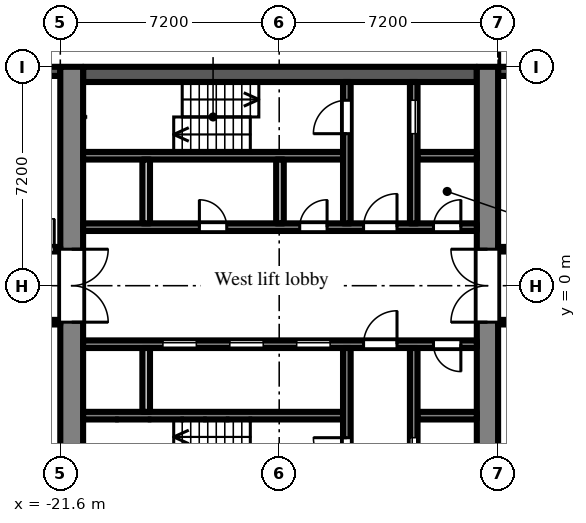
"""IFC4 building model, lengths in metres.
Left out: names, types, materials, properties, quantities, classifications, styles, units other than length and angle.
Written with IfcOpenShell. Run it as: python <this file> out.ifc"""

import sys

from ifc_helpers import new_model, si_unit, direction, frame, frame_2d, origin, place, context, subcontext, project, spatial, rectangle, extrude, element, fill, save


model = new_model("IFC4")
c1 = context("Model", 3, precision=1e-05, world=origin(), true_north=direction((0.0, 1.0)))
c2 = subcontext(c1, "Body", "Model", "MODEL_VIEW")
j1 = project(units=[si_unit("LENGTHUNIT", "METRE"), si_unit("PLANEANGLEUNIT", "RADIAN")], contexts=[c1])
p1 = place(None, origin())
s1 = spatial("IfcSite", under=j1, at=p1, CompositionType="ELEMENT")
p2 = place(p1, origin())
s2 = spatial("IfcBuilding", under=s1, at=p2, CompositionType="ELEMENT")
p3 = place(p2, frame((0.0, 0.0, 44.7)))
s3 = spatial("IfcBuildingStorey", under=s2, at=p3, CompositionType="ELEMENT", Elevation=44.7)
p4 = place(p3, frame((-4.2, 7.05, 0.0), z_axis=(0.0, 0.0, 1.0), x_axis=(-1.0, 0.0, 0.0)))
e1 = element("IfcWall", 1, at=p4, inside=s3, PredefinedType="SOLIDWALL", context=c2, shape_type="SweptSolid", body=[
    extrude(rectangle(XDim=3.0, YDim=0.3, at=frame_2d((1.5, 0.0))), origin(), (0.0, 0.0, 1.0), 2.1),
])
p5 = place(p3, frame((-21.6, 7.05, 0.0), z_axis=(0.0, 0.0, 1.0), x_axis=(-1.0, 0.0, 0.0)))
e2 = element("IfcWall", 2, at=p5, inside=s3, PredefinedType="SOLIDWALL", context=c2, shape_type="SweptSolid", body=[
    extrude(rectangle(XDim=2.7, YDim=0.3, at=frame_2d((1.35, 0.0))), origin(), (0.0, 0.0, 1.0), 2.1),
])
p6 = place(p5, frame((0.75, 0.0, 0.2)))
e3 = element("IfcOpeningElement", 3, at=p6, cuts=e2, PredefinedType="OPENING", context=c2, shape_type="SweptSolid", body=[
    extrude(rectangle(XDim=1.2, YDim=1.85, at=frame_2d((0.6, 0.925))), frame((0.0, 0.16, 0.0), z_axis=(0.0, -1.0, 0.0), x_axis=(1.0, 0.0, 0.0)), (0.0, 0.0, 1.0), 0.32),
])
p7 = place(p3, frame((-7.55, -7.2, 0.0), z_axis=(0.0, 0.0, 1.0), x_axis=(0.0, 1.0, 0.0)))
e4 = element("IfcWall", 4, at=p7, inside=s3, PredefinedType="SHEAR", context=c2, shape_type="SweptSolid", body=[
    extrude(rectangle(XDim=14.4, YDim=0.7, at=frame_2d((7.2, 0.0))), origin(), (0.0, 0.0, 1.0), 2.575),
])
p8 = place(p7, frame((6.0, 0.0, 0.0)))
e5 = element("IfcOpeningElement", 5, at=p8, cuts=e4, PredefinedType="OPENING", context=c2, shape_type="SweptSolid", body=[
    extrude(rectangle(XDim=2.4, YDim=2.2, at=frame_2d((1.2, 1.1))), frame((0.0, 0.36, 0.0), z_axis=(0.0, -1.0, 0.0), x_axis=(1.0, 0.0, 0.0)), (0.0, 0.0, 1.0), 0.72),
])
p9 = place(p3, frame((-21.225, -7.2, 0.0), z_axis=(0.0, 0.0, 1.0), x_axis=(0.0, 1.0, 0.0)))
e6 = element("IfcWall", 6, at=p9, inside=s3, PredefinedType="SHEAR", context=c2, shape_type="SweptSolid", body=[
    extrude(rectangle(XDim=14.4, YDim=0.75, at=frame_2d((7.2, 0.0))), origin(), (0.0, 0.0, 1.0), 2.575),
])
p10 = place(p9, frame((6.0, 0.0, 0.0)))
e7 = element("IfcOpeningElement", 7, at=p10, cuts=e6, PredefinedType="OPENING", context=c2, shape_type="SweptSolid", body=[
    extrude(rectangle(XDim=2.4, YDim=2.2, at=frame_2d((1.2, 1.1))), frame((0.0, 0.385, 0.0), z_axis=(0.0, -1.0, 0.0), x_axis=(1.0, 0.0, 0.0)), (0.0, 0.0, 1.0), 0.77),
])
p11 = place(p3, frame((-7.9, 6.95, 0.0), z_axis=(0.0, 0.0, 1.0), x_axis=(-1.0, 0.0, 0.0)))
e8 = element("IfcWall", 8, at=p11, inside=s3, PredefinedType="SHEAR", context=c2, shape_type="SweptSolid", body=[
    extrude(rectangle(XDim=12.95, YDim=0.5, at=frame_2d((6.475, 0.0))), origin(), (0.0, 0.0, 1.0), 2.575),
])
p12 = place(p3, frame((-7.9, 1.925, 0.0), z_axis=(0.0, 0.0, 1.0), x_axis=(-1.0, 0.0, 0.0)))
e9 = element("IfcWall", 9, at=p12, inside=s3, PredefinedType="SHEAR", context=c2, shape_type="SweptSolid", body=[
    extrude(rectangle(XDim=12.95, YDim=0.25, at=frame_2d((6.475, 0.0))), origin(), (0.0, 0.0, 1.0), 2.575),
])
p13 = place(p12, frame((0.525, 0.0, 0.0)))
e10 = element("IfcOpeningElement", 10, at=p13, cuts=e9, PredefinedType="OPENING", context=c2, shape_type="SweptSolid", body=[
    extrude(rectangle(XDim=0.9, YDim=2.1, at=frame_2d((0.45, 1.05))), frame((0.0, 0.135, 0.0), z_axis=(0.0, -1.0, 0.0), x_axis=(1.0, 0.0, 0.0)), (0.0, 0.0, 1.0), 0.27),
])
p14 = place(p12, frame((2.625, 0.0, 0.0)))
e11 = element("IfcOpeningElement", 11, at=p14, cuts=e9, PredefinedType="OPENING", context=c2, shape_type="SweptSolid", body=[
    extrude(rectangle(XDim=1.1, YDim=2.1, at=frame_2d((0.55, 1.05))), frame((0.0, 0.135, 0.0), z_axis=(0.0, -1.0, 0.0), x_axis=(1.0, 0.0, 0.0)), (0.0, 0.0, 1.0), 0.27),
])
p15 = place(p12, frame((4.925, 0.0, 0.0)))
e12 = element("IfcOpeningElement", 12, at=p15, cuts=e9, PredefinedType="OPENING", context=c2, shape_type="SweptSolid", body=[
    extrude(rectangle(XDim=0.9, YDim=2.1, at=frame_2d((0.45, 1.05))), frame((0.0, 0.135, 0.0), z_axis=(0.0, -1.0, 0.0), x_axis=(1.0, 0.0, 0.0)), (0.0, 0.0, 1.0), 0.27),
])
p16 = place(p12, frame((8.225, 0.0, 0.0)))
e13 = element("IfcOpeningElement", 13, at=p16, cuts=e9, PredefinedType="OPENING", context=c2, shape_type="SweptSolid", body=[
    extrude(rectangle(XDim=0.9, YDim=2.1, at=frame_2d((0.45, 1.05))), frame((0.0, 0.135, 0.0), z_axis=(0.0, -1.0, 0.0), x_axis=(1.0, 0.0, 0.0)), (0.0, 0.0, 1.0), 0.27),
])
p17 = place(p3, frame((-7.9, 4.275, 0.0), z_axis=(0.0, 0.0, 1.0), x_axis=(-1.0, 0.0, 0.0)))
e14 = element("IfcWall", 14, at=p17, inside=s3, PredefinedType="SHEAR", context=c2, shape_type="SweptSolid", body=[
    extrude(rectangle(XDim=1.95, YDim=0.25, at=frame_2d((0.975, 0.0))), origin(), (0.0, 0.0, 1.0), 2.575),
])
p18 = place(p3, frame((-12.3, 4.275, 0.0), z_axis=(0.0, 0.0, 1.0), x_axis=(-1.0, 0.0, 0.0)))
e15 = element("IfcWall", 15, at=p18, inside=s3, PredefinedType="SHEAR", context=c2, shape_type="SweptSolid", body=[
    extrude(rectangle(XDim=8.55, YDim=0.25, at=frame_2d((4.275, 0.0))), origin(), (0.0, 0.0, 1.0), 2.575),
])
p19 = place(p3, frame((-9.975, 2.05, 0.0), z_axis=(0.0, 0.0, 1.0), x_axis=(0.0, 1.0, 0.0)))
e16 = element("IfcWall", 16, at=p19, inside=s3, PredefinedType="SHEAR", context=c2, shape_type="SweptSolid", body=[
    extrude(rectangle(XDim=4.65, YDim=0.25, at=frame_2d((2.325, 0.0))), origin(), (0.0, 0.0, 1.0), 2.575),
])
p20 = place(p19, frame((2.95, 0.0, 0.0)))
e17 = element("IfcOpeningElement", 17, at=p20, cuts=e16, PredefinedType="OPENING", context=c2, shape_type="SweptSolid", body=[
    extrude(rectangle(XDim=1.1, YDim=2.1, at=frame_2d((0.55, 1.05))), frame((0.0, 0.135, 0.0), z_axis=(0.0, -1.0, 0.0), x_axis=(1.0, 0.0, 0.0)), (0.0, 0.0, 1.0), 0.27),
])
p21 = place(p3, frame((-12.175, 2.05, 0.0), z_axis=(0.0, 0.0, 1.0), x_axis=(0.0, 1.0, 0.0)))
e18 = element("IfcWall", 18, at=p21, inside=s3, PredefinedType="SHEAR", context=c2, shape_type="SweptSolid", body=[
    extrude(rectangle(XDim=4.65, YDim=0.25, at=frame_2d((2.325, 0.0))), origin(), (0.0, 0.0, 1.0), 2.575),
])
p22 = place(p21, frame((2.95, 0.0, 0.0)))
e19 = element("IfcOpeningElement", 19, at=p22, cuts=e18, PredefinedType="OPENING", context=c2, shape_type="SweptSolid", body=[
    extrude(rectangle(XDim=1.1, YDim=2.1, at=frame_2d((0.55, 1.05))), frame((0.0, 0.135, 0.0), z_axis=(0.0, -1.0, 0.0), x_axis=(1.0, 0.0, 0.0)), (0.0, 0.0, 1.0), 0.27),
])
for number, where, z_axis, x_axis in (
    (20, (-14.375, 2.05, 0.0), (0.0, 0.0, 1.0), (0.0, 1.0, 0.0)),
    (21, (-18.775, 2.05, 0.0), (0.0, 0.0, 1.0), (0.0, 1.0, 0.0)),
):
    element("IfcWall", number, at=place(p3, frame(where, z_axis=z_axis, x_axis=x_axis)), inside=s3, PredefinedType="PARTITIONING", context=c2, shape_type="SweptSolid", body=[
        extrude(rectangle(XDim=2.1, YDim=0.25, at=frame_2d((1.05, 0.0))), origin(), (0.0, 0.0, 1.0), 2.575),
    ])
p23 = place(p3, frame((-7.9, -1.925, 0.0), z_axis=(0.0, 0.0, 1.0), x_axis=(-1.0, 0.0, 0.0)))
e22 = element("IfcWall", 22, at=p23, inside=s3, PredefinedType="SHEAR", context=c2, shape_type="SweptSolid", body=[
    extrude(rectangle(XDim=12.95, YDim=0.25, at=frame_2d((6.475, 0.0))), origin(), (0.0, 0.0, 1.0), 2.575),
])
p24 = place(p23, frame((4.825, 0.0, 0.0)))
e23 = element("IfcOpeningElement", 23, at=p24, cuts=e22, PredefinedType="OPENING", context=c2, shape_type="SweptSolid", body=[
    extrude(rectangle(XDim=1.1, YDim=2.1, at=frame_2d((0.55, 1.05))), frame((0.0, 0.135, 0.0), z_axis=(0.0, -1.0, 0.0), x_axis=(1.0, 0.0, 0.0)), (0.0, 0.0, 1.0), 0.27),
])
p25 = place(p23, frame((7.025, 0.0, 0.0)))
e24 = element("IfcOpeningElement", 24, at=p25, cuts=e22, PredefinedType="OPENING", context=c2, shape_type="SweptSolid", body=[
    extrude(rectangle(XDim=1.1, YDim=2.1, at=frame_2d((0.55, 1.05))), frame((0.0, 0.135, 0.0), z_axis=(0.0, -1.0, 0.0), x_axis=(1.0, 0.0, 0.0)), (0.0, 0.0, 1.0), 0.27),
])
p26 = place(p23, frame((9.225, 0.0, 0.0)))
e25 = element("IfcOpeningElement", 25, at=p26, cuts=e22, PredefinedType="OPENING", context=c2, shape_type="SweptSolid", body=[
    extrude(rectangle(XDim=1.1, YDim=2.1, at=frame_2d((0.55, 1.05))), frame((0.0, 0.135, 0.0), z_axis=(0.0, -1.0, 0.0), x_axis=(1.0, 0.0, 0.0)), (0.0, 0.0, 1.0), 0.27),
])
p27 = place(p23, frame((0.525, 0.0, 0.0)))
e26 = element("IfcOpeningElement", 26, at=p27, cuts=e22, PredefinedType="OPENING", context=c2, shape_type="SweptSolid", body=[
    extrude(rectangle(XDim=0.9, YDim=2.1, at=frame_2d((0.45, 1.05))), frame((0.0, 0.135, 0.0), z_axis=(0.0, -1.0, 0.0), x_axis=(1.0, 0.0, 0.0)), (0.0, 0.0, 1.0), 0.27),
])
p28 = place(p23, frame((2.625, 0.0, 0.0)))
e27 = element("IfcOpeningElement", 27, at=p28, cuts=e22, PredefinedType="OPENING", context=c2, shape_type="SweptSolid", body=[
    extrude(rectangle(XDim=1.1, YDim=2.1, at=frame_2d((0.55, 1.05))), frame((0.0, 0.135, 0.0), z_axis=(0.0, -1.0, 0.0), x_axis=(1.0, 0.0, 0.0)), (0.0, 0.0, 1.0), 0.27),
])
p29 = place(p3, frame((-7.9, -4.275, 0.0), z_axis=(0.0, 0.0, 1.0), x_axis=(-1.0, 0.0, 0.0)))
e28 = element("IfcWall", 28, at=p29, inside=s3, PredefinedType="SHEAR", context=c2, shape_type="SweptSolid", body=[
    extrude(rectangle(XDim=1.95, YDim=0.25, at=frame_2d((0.975, 0.0))), origin(), (0.0, 0.0, 1.0), 2.575),
])
p30 = place(p3, frame((-12.3, -4.275, 0.0), z_axis=(0.0, 0.0, 1.0), x_axis=(-1.0, 0.0, 0.0)))
e29 = element("IfcWall", 29, at=p30, inside=s3, PredefinedType="SHEAR", context=c2, shape_type="SweptSolid", body=[
    extrude(rectangle(XDim=8.55, YDim=0.25, at=frame_2d((4.275, 0.0))), origin(), (0.0, 0.0, 1.0), 2.575),
])
p31 = place(p3, frame((-9.975, -2.05, 0.0), z_axis=(0.0, 0.0, 1.0), x_axis=(0.0, -1.0, 0.0)))
e30 = element("IfcWall", 30, at=p31, inside=s3, PredefinedType="SHEAR", context=c2, shape_type="SweptSolid", body=[
    extrude(rectangle(XDim=4.65, YDim=0.25, at=frame_2d((2.325, 0.0))), origin(), (0.0, 0.0, 1.0), 2.575),
])
p32 = place(p31, frame((2.95, 0.0, 0.0)))
e31 = element("IfcOpeningElement", 31, at=p32, cuts=e30, PredefinedType="OPENING", context=c2, shape_type="SweptSolid", body=[
    extrude(rectangle(XDim=1.1, YDim=2.1, at=frame_2d((0.55, 1.05))), frame((0.0, 0.135, 0.0), z_axis=(0.0, -1.0, 0.0), x_axis=(1.0, 0.0, 0.0)), (0.0, 0.0, 1.0), 0.27),
])
p33 = place(p3, frame((-12.175, -2.05, 0.0), z_axis=(0.0, 0.0, 1.0), x_axis=(0.0, -1.0, 0.0)))
e32 = element("IfcWall", 32, at=p33, inside=s3, PredefinedType="SHEAR", context=c2, shape_type="SweptSolid", body=[
    extrude(rectangle(XDim=4.65, YDim=0.25, at=frame_2d((2.325, 0.0))), origin(), (0.0, 0.0, 1.0), 2.575),
])
p34 = place(p33, frame((2.95, 0.0, 0.0)))
e33 = element("IfcOpeningElement", 33, at=p34, cuts=e32, PredefinedType="OPENING", context=c2, shape_type="SweptSolid", body=[
    extrude(rectangle(XDim=1.1, YDim=2.1, at=frame_2d((0.55, 1.05))), frame((0.0, 0.135, 0.0), z_axis=(0.0, -1.0, 0.0), x_axis=(1.0, 0.0, 0.0)), (0.0, 0.0, 1.0), 0.27),
])
p35 = place(p3, frame((-18.775, -2.05, 0.0), z_axis=(0.0, 0.0, 1.0), x_axis=(0.0, -1.0, 0.0)))
e34 = element("IfcWall", 34, at=p35, inside=s3, PredefinedType="PARTITIONING", context=c2, shape_type="SweptSolid", body=[
    extrude(rectangle(XDim=2.1, YDim=0.25, at=frame_2d((1.05, 0.0))), origin(), (0.0, 0.0, 1.0), 2.575),
])
p36 = place(p3, frame((-36.5, -1.2, 0.0), z_axis=(0.0, 0.0, 1.0), x_axis=(1.0, 0.0, 0.0)))
e35 = element("IfcWall", 35, at=p36, inside=s3, PredefinedType="PARTITIONING", context=c2, shape_type="SweptSolid", body=[
    extrude(rectangle(XDim=14.9, YDim=0.15, at=frame_2d((7.45, 0.0))), origin(), (0.0, 0.0, 1.0), 2.575),
])
p37 = place(p36, frame((13.3, 0.0, 0.0)))
e36 = element("IfcOpeningElement", 36, at=p37, cuts=e35, PredefinedType="OPENING", context=c2, shape_type="SweptSolid", body=[
    extrude(rectangle(XDim=1.0, YDim=2.1, at=frame_2d((0.5, 1.05))), frame((0.0, 0.085, 0.0), z_axis=(0.0, -1.0, 0.0), x_axis=(1.0, 0.0, 0.0)), (0.0, 0.0, 1.0), 0.17),
])
p38 = place(p36, frame((4.41, 0.0, 0.0)))
e37 = element("IfcOpeningElement", 37, at=p38, cuts=e35, PredefinedType="OPENING", context=c2, shape_type="SweptSolid", body=[
    extrude(rectangle(XDim=1.0, YDim=2.1, at=frame_2d((0.5, 1.05))), frame((0.0, 0.085, 0.0), z_axis=(0.0, -1.0, 0.0), x_axis=(1.0, 0.0, 0.0)), (0.0, 0.0, 1.0), 0.17),
])
p39 = place(p36, frame((1.15, 0.0, 0.0)))
e38 = element("IfcOpeningElement", 38, at=p39, cuts=e35, PredefinedType="OPENING", context=c2, shape_type="SweptSolid", body=[
    extrude(rectangle(XDim=1.8, YDim=2.1, at=frame_2d((0.9, 1.05))), frame((0.0, 0.085, 0.0), z_axis=(0.0, -1.0, 0.0), x_axis=(1.0, 0.0, 0.0)), (0.0, 0.0, 1.0), 0.17),
])
p40 = place(p3, frame((-36.5, 1.2, 0.0), z_axis=(0.0, 0.0, 1.0), x_axis=(1.0, 0.0, 0.0)))
e39 = element("IfcWall", 39, at=p40, inside=s3, PredefinedType="PARTITIONING", context=c2, shape_type="SweptSolid", body=[
    extrude(rectangle(XDim=14.9, YDim=0.15, at=frame_2d((7.45, 0.0))), origin(), (0.0, 0.0, 1.0), 2.575),
])
p41 = place(p40, frame((13.7, 0.0, 0.0)))
e40 = element("IfcOpeningElement", 40, at=p41, cuts=e39, PredefinedType="OPENING", context=c2, shape_type="SweptSolid", body=[
    extrude(rectangle(XDim=1.0, YDim=2.1, at=frame_2d((0.5, 1.05))), frame((0.0, 0.085, 0.0), z_axis=(0.0, -1.0, 0.0), x_axis=(1.0, 0.0, 0.0)), (0.0, 0.0, 1.0), 0.17),
])
p42 = place(p40, frame((8.3, 0.0, 0.0)))
e41 = element("IfcOpeningElement", 41, at=p42, cuts=e39, PredefinedType="OPENING", context=c2, shape_type="SweptSolid", body=[
    extrude(rectangle(XDim=1.0, YDim=2.1, at=frame_2d((0.5, 1.05))), frame((0.0, 0.085, 0.0), z_axis=(0.0, -1.0, 0.0), x_axis=(1.0, 0.0, 0.0)), (0.0, 0.0, 1.0), 0.17),
])
p43 = place(p40, frame((6.35, 0.0, 0.0)))
e42 = element("IfcOpeningElement", 42, at=p43, cuts=e39, PredefinedType="OPENING", context=c2, shape_type="SweptSolid", body=[
    extrude(rectangle(XDim=0.9, YDim=2.1, at=frame_2d((0.45, 1.05))), frame((0.0, 0.085, 0.0), z_axis=(0.0, -1.0, 0.0), x_axis=(1.0, 0.0, 0.0)), (0.0, 0.0, 1.0), 0.17),
])
p44 = place(p40, frame((4.55, 0.0, 0.0)))
e43 = element("IfcOpeningElement", 43, at=p44, cuts=e39, PredefinedType="OPENING", context=c2, shape_type="SweptSolid", body=[
    extrude(rectangle(XDim=0.9, YDim=2.1, at=frame_2d((0.45, 1.05))), frame((0.0, 0.085, 0.0), z_axis=(0.0, -1.0, 0.0), x_axis=(1.0, 0.0, 0.0)), (0.0, 0.0, 1.0), 0.17),
])
p45 = place(p40, frame((1.15, 0.0, 0.0)))
e44 = element("IfcOpeningElement", 44, at=p45, cuts=e39, PredefinedType="OPENING", context=c2, shape_type="SweptSolid", body=[
    extrude(rectangle(XDim=1.8, YDim=2.1, at=frame_2d((0.9, 1.05))), frame((0.0, 0.085, 0.0), z_axis=(0.0, -1.0, 0.0), x_axis=(1.0, 0.0, 0.0)), (0.0, 0.0, 1.0), 0.17),
])
p46 = place(p3, frame((-7.2, -1.2, 0.0), z_axis=(0.0, 0.0, 1.0), x_axis=(1.0, 0.0, 0.0)))
e45 = element("IfcWall", 45, at=p46, inside=s3, PredefinedType="PARTITIONING", context=c2, shape_type="SweptSolid", body=[
    extrude(rectangle(XDim=6.075, YDim=0.15, at=frame_2d((3.038, 0.0))), origin(), (0.0, 0.0, 1.0), 2.575),
])
p47 = place(p46, frame((1.55, 0.0, 0.0)))
e46 = element("IfcOpeningElement", 46, at=p47, cuts=e45, PredefinedType="OPENING", context=c2, shape_type="SweptSolid", body=[
    extrude(rectangle(XDim=0.9, YDim=2.1, at=frame_2d((0.45, 1.05))), frame((0.0, 0.085, 0.0), z_axis=(0.0, -1.0, 0.0), x_axis=(1.0, 0.0, 0.0)), (0.0, 0.0, 1.0), 0.17),
])
p48 = place(p3, frame((-7.2, 1.2, 0.0), z_axis=(0.0, 0.0, 1.0), x_axis=(1.0, 0.0, 0.0)))
e47 = element("IfcWall", 47, at=p48, inside=s3, PredefinedType="PARTITIONING", context=c2, shape_type="SweptSolid", body=[
    extrude(rectangle(XDim=6.075, YDim=0.15, at=frame_2d((3.038, 0.0))), origin(), (0.0, 0.0, 1.0), 2.575),
])
p49 = place(p24, origin())
e48 = element("IfcDoor", 48, at=p49, inside=s3, OperationType="SLIDING_TO_LEFT", PredefinedType="DOOR", context=c2, shape_type="SweptSolid", body=[
    extrude(rectangle(XDim=1.1, YDim=2.1, at=frame_2d((0.55, 1.05))), frame((0.0, 0.025, 0.0), z_axis=(0.0, -1.0, 0.0), x_axis=(1.0, 0.0, 0.0)), (0.0, 0.0, 1.0), 0.05),
])
fill(e23, e48)
p50 = place(p25, origin())
e49 = element("IfcDoor", 49, at=p50, inside=s3, OperationType="SLIDING_TO_LEFT", PredefinedType="DOOR", context=c2, shape_type="SweptSolid", body=[
    extrude(rectangle(XDim=1.1, YDim=2.1, at=frame_2d((0.55, 1.05))), frame((0.0, 0.025, 0.0), z_axis=(0.0, -1.0, 0.0), x_axis=(1.0, 0.0, 0.0)), (0.0, 0.0, 1.0), 0.05),
])
fill(e24, e49)
p51 = place(p26, origin())
e50 = element("IfcDoor", 50, at=p51, inside=s3, OperationType="SLIDING_TO_LEFT", PredefinedType="DOOR", context=c2, shape_type="SweptSolid", body=[
    extrude(rectangle(XDim=1.1, YDim=2.1, at=frame_2d((0.55, 1.05))), frame((0.0, 0.025, 0.0), z_axis=(0.0, -1.0, 0.0), x_axis=(1.0, 0.0, 0.0)), (0.0, 0.0, 1.0), 0.05),
])
fill(e25, e50)
p52 = place(p20, origin())
e51 = element("IfcDoor", 51, at=p52, inside=s3, OperationType="SLIDING_TO_LEFT", PredefinedType="DOOR", context=c2, shape_type="SweptSolid", body=[
    extrude(rectangle(XDim=1.1, YDim=2.1, at=frame_2d((0.55, 1.05))), frame((0.0, 0.025, 0.0), z_axis=(0.0, -1.0, 0.0), x_axis=(1.0, 0.0, 0.0)), (0.0, 0.0, 1.0), 0.05),
])
fill(e17, e51)
p53 = place(p32, origin())
e52 = element("IfcDoor", 52, at=p53, inside=s3, OperationType="SLIDING_TO_LEFT", PredefinedType="DOOR", context=c2, shape_type="SweptSolid", body=[
    extrude(rectangle(XDim=1.1, YDim=2.1, at=frame_2d((0.55, 1.05))), frame((0.0, 0.025, 0.0), z_axis=(0.0, -1.0, 0.0), x_axis=(1.0, 0.0, 0.0)), (0.0, 0.0, 1.0), 0.05),
])
fill(e31, e52)
p54 = place(p22, origin())
e53 = element("IfcDoor", 53, at=p54, inside=s3, OperationType="SINGLE_SWING_LEFT", PredefinedType="DOOR", context=c2, shape_type="SweptSolid", body=[
    extrude(rectangle(XDim=1.1, YDim=2.1, at=frame_2d((0.55, 1.05))), frame((0.0, 0.025, 0.0), z_axis=(0.0, -1.0, 0.0), x_axis=(1.0, 0.0, 0.0)), (0.0, 0.0, 1.0), 0.05),
])
fill(e19, e53)
p55 = place(p34, frame((1.1, 0.0, 0.0), z_axis=(0.0, 0.0, 1.0), x_axis=(-1.0, 0.0, 0.0)))
e54 = element("IfcDoor", 54, at=p55, inside=s3, OperationType="SINGLE_SWING_RIGHT", PredefinedType="DOOR", context=c2, shape_type="SweptSolid", body=[
    extrude(rectangle(XDim=1.1, YDim=2.1, at=frame_2d((0.55, 1.05))), frame((0.0, 0.025, 0.0), z_axis=(0.0, -1.0, 0.0), x_axis=(1.0, 0.0, 0.0)), (0.0, 0.0, 1.0), 0.05),
])
fill(e33, e54)
p56 = place(p13, frame((0.9, 0.0, 0.0), z_axis=(0.0, 0.0, 1.0), x_axis=(-1.0, 0.0, 0.0)))
e55 = element("IfcDoor", 55, at=p56, inside=s3, OperationType="SINGLE_SWING_RIGHT", PredefinedType="DOOR", context=c2, shape_type="SweptSolid", body=[
    extrude(rectangle(XDim=0.9, YDim=2.1, at=frame_2d((0.45, 1.05))), frame((0.0, 0.025, 0.0), z_axis=(0.0, -1.0, 0.0), x_axis=(1.0, 0.0, 0.0)), (0.0, 0.0, 1.0), 0.05),
])
fill(e10, e55)
p57 = place(p27, origin())
e56 = element("IfcDoor", 56, at=p57, inside=s3, OperationType="SINGLE_SWING_LEFT", PredefinedType="DOOR", context=c2, shape_type="SweptSolid", body=[
    extrude(rectangle(XDim=0.9, YDim=2.1, at=frame_2d((0.45, 1.05))), frame((0.0, 0.025, 0.0), z_axis=(0.0, -1.0, 0.0), x_axis=(1.0, 0.0, 0.0)), (0.0, 0.0, 1.0), 0.05),
])
fill(e26, e56)
p58 = place(p14, frame((1.1, 0.0, 0.0), z_axis=(0.0, 0.0, 1.0), x_axis=(-1.0, 0.0, 0.0)))
e57 = element("IfcDoor", 57, at=p58, inside=s3, OperationType="SINGLE_SWING_RIGHT", PredefinedType="DOOR", context=c2, shape_type="SweptSolid", body=[
    extrude(rectangle(XDim=1.1, YDim=2.1, at=frame_2d((0.55, 1.05))), frame((0.0, 0.025, 0.0), z_axis=(0.0, -1.0, 0.0), x_axis=(1.0, 0.0, 0.0)), (0.0, 0.0, 1.0), 0.05),
])
fill(e11, e57)
p59 = place(p28, frame((1.1, 0.0, 0.0), z_axis=(0.0, 0.0, 1.0), x_axis=(-1.0, 0.0, 0.0)))
e58 = element("IfcDoor", 58, at=p59, inside=s3, OperationType="SINGLE_SWING_RIGHT", PredefinedType="DOOR", context=c2, shape_type="SweptSolid", body=[
    extrude(rectangle(XDim=1.1, YDim=2.1, at=frame_2d((0.55, 1.05))), frame((0.0, 0.025, 0.0), z_axis=(0.0, -1.0, 0.0), x_axis=(1.0, 0.0, 0.0)), (0.0, 0.0, 1.0), 0.05),
])
fill(e27, e58)
p60 = place(p8, origin())
e59 = element("IfcDoor", 59, at=p60, inside=s3, OperationType="DOUBLE_DOOR_DOUBLE_SWING", PredefinedType="DOOR", context=c2, shape_type="SweptSolid", body=[
    extrude(rectangle(XDim=2.4, YDim=2.2, at=frame_2d((1.2, 1.1))), frame((0.0, 0.025, 0.0), z_axis=(0.0, -1.0, 0.0), x_axis=(1.0, 0.0, 0.0)), (0.0, 0.0, 1.0), 0.05),
])
fill(e5, e59)
p61 = place(p10, frame((2.4, 0.0, 0.0), z_axis=(0.0, 0.0, 1.0), x_axis=(-1.0, 0.0, 0.0)))
e60 = element("IfcDoor", 60, at=p61, inside=s3, OperationType="DOUBLE_DOOR_DOUBLE_SWING", PredefinedType="DOOR", context=c2, shape_type="SweptSolid", body=[
    extrude(rectangle(XDim=2.4, YDim=2.2, at=frame_2d((1.2, 1.1))), frame((0.0, 0.025, 0.0), z_axis=(0.0, -1.0, 0.0), x_axis=(1.0, 0.0, 0.0)), (0.0, 0.0, 1.0), 0.05),
])
fill(e7, e60)
p62 = place(p15, frame((0.9, 0.0, 0.0), z_axis=(0.0, 0.0, 1.0), x_axis=(-1.0, 0.0, 0.0)))
e61 = element("IfcDoor", 61, at=p62, inside=s3, OperationType="SINGLE_SWING_RIGHT", PredefinedType="DOOR", context=c2, shape_type="SweptSolid", body=[
    extrude(rectangle(XDim=0.9, YDim=2.1, at=frame_2d((0.45, 1.05))), frame((0.0, 0.025, 0.0), z_axis=(0.0, -1.0, 0.0), x_axis=(1.0, 0.0, 0.0)), (0.0, 0.0, 1.0), 0.05),
])
fill(e12, e61)
p63 = place(p16, frame((0.9, 0.0, 0.0), z_axis=(0.0, 0.0, 1.0), x_axis=(-1.0, 0.0, 0.0)))
e62 = element("IfcDoor", 62, at=p63, inside=s3, OperationType="SINGLE_SWING_LEFT", PredefinedType="DOOR", context=c2, shape_type="SweptSolid", body=[
    extrude(rectangle(XDim=0.9, YDim=2.1, at=frame_2d((0.45, 1.05))), frame((0.0, 0.025, 0.0), z_axis=(0.0, -1.0, 0.0), x_axis=(1.0, 0.0, 0.0)), (0.0, 0.0, 1.0), 0.05),
])
fill(e13, e62)
p64 = place(p41, origin())
e63 = element("IfcDoor", 63, at=p64, inside=s3, OperationType="SINGLE_SWING_RIGHT", PredefinedType="DOOR", context=c2, shape_type="SweptSolid", body=[
    extrude(rectangle(XDim=1.0, YDim=2.1, at=frame_2d((0.5, 1.05))), frame((0.0, 0.025, 0.0), z_axis=(0.0, -1.0, 0.0), x_axis=(1.0, 0.0, 0.0)), (0.0, 0.0, 1.0), 0.05),
])
fill(e40, e63)
save(model, sys.argv[1])
